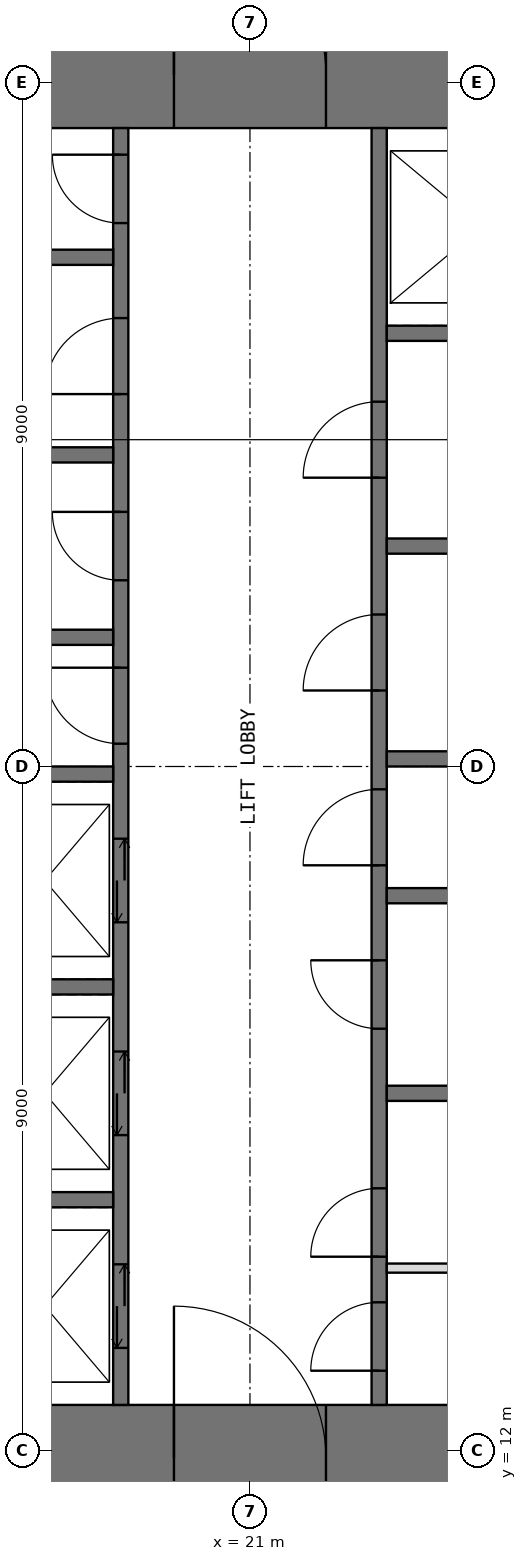
"""IFC4 building model, lengths in metres.
Left out: names, types, materials, properties, quantities, classifications, styles, units other than length and angle.
Written with IfcOpenShell. Run it as: python <this file> out.ifc"""

import sys

from ifc_helpers import new_model, si_unit, direction, frame, frame_2d, origin, place, context, subcontext, project, spatial, rectangle, extrude, element, fill, save


model = new_model("IFC4")
c1 = context("Model", 3, precision=1e-05, world=origin(), true_north=direction((0.0, 1.0)))
c2 = subcontext(c1, "Body", "Model", "MODEL_VIEW")
j1 = project(units=[si_unit("LENGTHUNIT", "METRE"), si_unit("PLANEANGLEUNIT", "RADIAN")], contexts=[c1])
p1 = place(None, origin())
s1 = spatial("IfcSite", under=j1, at=p1, CompositionType="ELEMENT")
p2 = place(p1, origin())
s2 = spatial("IfcBuilding", under=s1, at=p2, CompositionType="ELEMENT")
p3 = place(p2, frame((0.0, 0.0, 174.5)))
s3 = spatial("IfcBuildingStorey", under=s2, at=p3, CompositionType="ELEMENT", Elevation=174.5)
p4 = place(p3, frame((11.2, 11.9, -0.05), z_axis=(0.0, 0.0, 1.0), x_axis=(1.0, 0.0, 0.0)))
e1 = element("IfcWall", 1, at=p4, inside=s3, PredefinedType="SHEAR", context=c2, shape_type="SweptSolid", body=[
    extrude(rectangle(XDim=19.6, YDim=1.4, at=frame_2d((9.8, 0.0))), origin(), (0.0, 0.0, 1.0), 4.0),
])
p5 = place(p4, frame((8.8, 0.0, 0.05)))
e2 = element("IfcOpeningElement", 2, at=p5, cuts=e1, PredefinedType="OPENING", context=c2, shape_type="SweptSolid", body=[
    extrude(rectangle(XDim=2.0, YDim=2.2, at=frame_2d((1.0, 1.1))), frame((0.0, 0.71, 0.0), z_axis=(0.0, -1.0, 0.0), x_axis=(1.0, 0.0, 0.0)), (0.0, 0.0, 1.0), 1.42),
])
p6 = place(p3, frame((11.2, 30.1, -0.05), z_axis=(0.0, 0.0, 1.0), x_axis=(1.0, 0.0, 0.0)))
e3 = element("IfcWall", 3, at=p6, inside=s3, PredefinedType="SHEAR", context=c2, shape_type="SweptSolid", body=[
    extrude(rectangle(XDim=19.6, YDim=1.4, at=frame_2d((9.8, 0.0))), origin(), (0.0, 0.0, 1.0), 4.0),
])
p7 = place(p6, frame((8.8, 0.0, 0.05)))
e4 = element("IfcOpeningElement", 4, at=p7, cuts=e3, PredefinedType="OPENING", context=c2, shape_type="SweptSolid", body=[
    extrude(rectangle(XDim=2.0, YDim=2.2, at=frame_2d((1.0, 1.1))), frame((0.0, 0.71, 0.0), z_axis=(0.0, -1.0, 0.0), x_axis=(1.0, 0.0, 0.0)), (0.0, 0.0, 1.0), 1.42),
])
p8 = place(p3, frame((19.3, 12.6, -0.05), z_axis=(0.0, 0.0, 1.0), x_axis=(0.0, 1.0, 0.0)))
e5 = element("IfcWall", 5, at=p8, inside=s3, PredefinedType="SHEAR", context=c2, shape_type="SweptSolid", body=[
    extrude(rectangle(XDim=16.8, YDim=0.2, at=frame_2d((8.4, 0.0))), origin(), (0.0, 0.0, 1.0), 4.0),
])
p9 = place(p8, frame((8.7, 0.0, 0.05)))
e6 = element("IfcOpeningElement", 6, at=p9, cuts=e5, PredefinedType="OPENING", context=c2, shape_type="SweptSolid", body=[
    extrude(rectangle(XDim=1.0, YDim=2.2, at=frame_2d((0.5, 1.1))), frame((0.0, 0.11, 0.0), z_axis=(0.0, -1.0, 0.0), x_axis=(1.0, 0.0, 0.0)), (0.0, 0.0, 1.0), 0.22),
])
p10 = place(p8, frame((10.85, 0.0, 0.05)))
e7 = element("IfcOpeningElement", 7, at=p10, cuts=e5, PredefinedType="OPENING", context=c2, shape_type="SweptSolid", body=[
    extrude(rectangle(XDim=0.9, YDim=2.2, at=frame_2d((0.45, 1.1))), frame((0.0, 0.11, 0.0), z_axis=(0.0, -1.0, 0.0), x_axis=(1.0, 0.0, 0.0)), (0.0, 0.0, 1.0), 0.22),
])
p11 = place(p8, frame((13.3, 0.0, 0.05)))
e8 = element("IfcOpeningElement", 8, at=p11, cuts=e5, PredefinedType="OPENING", context=c2, shape_type="SweptSolid", body=[
    extrude(rectangle(XDim=1.0, YDim=2.2, at=frame_2d((0.5, 1.1))), frame((0.0, 0.11, 0.0), z_axis=(0.0, -1.0, 0.0), x_axis=(1.0, 0.0, 0.0)), (0.0, 0.0, 1.0), 0.22),
])
p12 = place(p8, frame((15.55, 0.0, 0.05)))
e9 = element("IfcOpeningElement", 9, at=p12, cuts=e5, PredefinedType="OPENING", context=c2, shape_type="SweptSolid", body=[
    extrude(rectangle(XDim=0.9, YDim=2.2, at=frame_2d((0.45, 1.1))), frame((0.0, 0.11, 0.0), z_axis=(0.0, -1.0, 0.0), x_axis=(1.0, 0.0, 0.0)), (0.0, 0.0, 1.0), 0.22),
])
p13 = place(p8, frame((0.75, 0.0, 0.05)))
e10 = element("IfcOpeningElement", 10, at=p13, cuts=e5, PredefinedType="OPENING", context=c2, shape_type="SweptSolid", body=[
    extrude(rectangle(XDim=1.1, YDim=2.2, at=frame_2d((0.55, 1.1))), frame((0.0, 0.11, 0.0), z_axis=(0.0, -1.0, 0.0), x_axis=(1.0, 0.0, 0.0)), (0.0, 0.0, 1.0), 0.22),
])
p14 = place(p8, frame((3.55, 0.0, 0.05)))
e11 = element("IfcOpeningElement", 11, at=p14, cuts=e5, PredefinedType="OPENING", context=c2, shape_type="SweptSolid", body=[
    extrude(rectangle(XDim=1.1, YDim=2.2, at=frame_2d((0.55, 1.1))), frame((0.0, 0.11, 0.0), z_axis=(0.0, -1.0, 0.0), x_axis=(1.0, 0.0, 0.0)), (0.0, 0.0, 1.0), 0.22),
])
p15 = place(p8, frame((6.35, 0.0, 0.05)))
e12 = element("IfcOpeningElement", 12, at=p15, cuts=e5, PredefinedType="OPENING", context=c2, shape_type="SweptSolid", body=[
    extrude(rectangle(XDim=1.1, YDim=2.2, at=frame_2d((0.55, 1.1))), frame((0.0, 0.11, 0.0), z_axis=(0.0, -1.0, 0.0), x_axis=(1.0, 0.0, 0.0)), (0.0, 0.0, 1.0), 0.22),
])
p16 = place(p3, frame((22.7, 12.6, -0.05), z_axis=(0.0, 0.0, 1.0), x_axis=(0.0, 1.0, 0.0)))
e13 = element("IfcWall", 13, at=p16, inside=s3, PredefinedType="SHEAR", context=c2, shape_type="SweptSolid", body=[
    extrude(rectangle(XDim=16.8, YDim=0.2, at=frame_2d((8.4, 0.0))), origin(), (0.0, 0.0, 1.0), 4.0),
])
p17 = place(p16, frame((0.45, 0.0, 0.05)))
e14 = element("IfcOpeningElement", 14, at=p17, cuts=e13, PredefinedType="OPENING", context=c2, shape_type="SweptSolid", body=[
    extrude(rectangle(XDim=0.9, YDim=2.2, at=frame_2d((0.45, 1.1))), frame((0.0, 0.11, 0.0), z_axis=(0.0, -1.0, 0.0), x_axis=(1.0, 0.0, 0.0)), (0.0, 0.0, 1.0), 0.22),
])
p18 = place(p16, frame((7.1, 0.0, 0.05)))
e15 = element("IfcOpeningElement", 15, at=p18, cuts=e13, PredefinedType="OPENING", context=c2, shape_type="SweptSolid", body=[
    extrude(rectangle(XDim=1.0, YDim=2.2, at=frame_2d((0.5, 1.1))), frame((0.0, 0.11, 0.0), z_axis=(0.0, -1.0, 0.0), x_axis=(1.0, 0.0, 0.0)), (0.0, 0.0, 1.0), 0.22),
])
p19 = place(p16, frame((1.95, 0.0, 0.05)))
e16 = element("IfcOpeningElement", 16, at=p19, cuts=e13, PredefinedType="OPENING", context=c2, shape_type="SweptSolid", body=[
    extrude(rectangle(XDim=0.9, YDim=2.2, at=frame_2d((0.45, 1.1))), frame((0.0, 0.11, 0.0), z_axis=(0.0, -1.0, 0.0), x_axis=(1.0, 0.0, 0.0)), (0.0, 0.0, 1.0), 0.22),
])
p20 = place(p16, frame((4.95, 0.0, 0.05)))
e17 = element("IfcOpeningElement", 17, at=p20, cuts=e13, PredefinedType="OPENING", context=c2, shape_type="SweptSolid", body=[
    extrude(rectangle(XDim=0.9, YDim=2.2, at=frame_2d((0.45, 1.1))), frame((0.0, 0.11, 0.0), z_axis=(0.0, -1.0, 0.0), x_axis=(1.0, 0.0, 0.0)), (0.0, 0.0, 1.0), 0.22),
])
p21 = place(p16, frame((9.4, 0.0, 0.05)))
e18 = element("IfcOpeningElement", 18, at=p21, cuts=e13, PredefinedType="OPENING", context=c2, shape_type="SweptSolid", body=[
    extrude(rectangle(XDim=1.0, YDim=2.2, at=frame_2d((0.5, 1.1))), frame((0.0, 0.11, 0.0), z_axis=(0.0, -1.0, 0.0), x_axis=(1.0, 0.0, 0.0)), (0.0, 0.0, 1.0), 0.22),
])
p22 = place(p16, frame((12.2, 0.0, 0.05)))
e19 = element("IfcOpeningElement", 19, at=p22, cuts=e13, PredefinedType="OPENING", context=c2, shape_type="SweptSolid", body=[
    extrude(rectangle(XDim=1.0, YDim=2.2, at=frame_2d((0.5, 1.1))), frame((0.0, 0.11, 0.0), z_axis=(0.0, -1.0, 0.0), x_axis=(1.0, 0.0, 0.0)), (0.0, 0.0, 1.0), 0.22),
])
for number, where, z_axis, x_axis in (
    (20, (16.0, 15.3, -0.05), (0.0, 0.0, 1.0), (1.0, 0.0, 0.0)),
    (21, (16.0, 18.1, -0.05), (0.0, 0.0, 1.0), (1.0, 0.0, 0.0)),
    (22, (16.0, 20.9, -0.05), (0.0, 0.0, 1.0), (1.0, 0.0, 0.0)),
    (23, (16.0, 22.7, -0.05), (0.0, 0.0, 1.0), (1.0, 0.0, 0.0)),
    (24, (16.0, 25.1, -0.05), (0.0, 0.0, 1.0), (1.0, 0.0, 0.0)),
    (25, (16.0, 27.7, -0.05), (0.0, 0.0, 1.0), (1.0, 0.0, 0.0)),
    (26, (22.8, 16.7, -0.05), (0.0, 0.0, 1.0), (1.0, 0.0, 0.0)),
    (27, (22.8, 19.3, -0.05), (0.0, 0.0, 1.0), (1.0, 0.0, 0.0)),
    (28, (22.8, 21.1, -0.05), (0.0, 0.0, 1.0), (1.0, 0.0, 0.0)),
    (29, (22.8, 23.9, -0.05), (0.0, 0.0, 1.0), (1.0, 0.0, 0.0)),
    (30, (22.8, 26.7, -0.05), (0.0, 0.0, 1.0), (1.0, 0.0, 0.0)),
):
    element("IfcWall", number, at=place(p3, frame(where, z_axis=z_axis, x_axis=x_axis)), inside=s3, PredefinedType="SHEAR", context=c2, shape_type="SweptSolid", body=[
        extrude(rectangle(XDim=3.2, YDim=0.2, at=frame_2d((1.6, 0.0))), origin(), (0.0, 0.0, 1.0), 4.0),
    ])
p23 = place(p3, frame((22.8, 14.4, 0.0), z_axis=(0.0, 0.0, 1.0), x_axis=(1.0, 0.0, 0.0)))
e31 = element("IfcWall", 31, at=p23, inside=s3, PredefinedType="PARTITIONING", context=c2, shape_type="SweptSolid", body=[
    extrude(rectangle(XDim=3.2, YDim=0.12, at=frame_2d((1.6, 0.0))), origin(), (0.0, 0.0, 1.0), 3.75),
])
p24 = place(p5, origin())
e32 = element("IfcDoor", 32, at=p24, inside=s3, OperationType="DOUBLE_DOOR_SINGLE_SWING", PredefinedType="DOOR", context=c2, shape_type="SweptSolid", body=[
    extrude(rectangle(XDim=2.0, YDim=2.2, at=frame_2d((1.0, 1.1))), frame((0.0, 0.025, 0.0), z_axis=(0.0, -1.0, 0.0), x_axis=(1.0, 0.0, 0.0)), (0.0, 0.0, 1.0), 0.05),
])
fill(e2, e32)
p25 = place(p7, origin())
e33 = element("IfcDoor", 33, at=p25, inside=s3, OperationType="DOUBLE_DOOR_SINGLE_SWING", PredefinedType="DOOR", context=c2, shape_type="SweptSolid", body=[
    extrude(rectangle(XDim=2.0, YDim=2.2, at=frame_2d((1.0, 1.1))), frame((0.0, 0.025, 0.0), z_axis=(0.0, -1.0, 0.0), x_axis=(1.0, 0.0, 0.0)), (0.0, 0.0, 1.0), 0.05),
])
fill(e4, e33)
p26 = place(p17, origin())
e34 = element("IfcDoor", 34, at=p26, inside=s3, OperationType="SINGLE_SWING_LEFT", PredefinedType="DOOR", context=c2, shape_type="SweptSolid", body=[
    extrude(rectangle(XDim=0.9, YDim=2.2, at=frame_2d((0.45, 1.1))), frame((0.0, 0.025, 0.0), z_axis=(0.0, -1.0, 0.0), x_axis=(1.0, 0.0, 0.0)), (0.0, 0.0, 1.0), 0.05),
])
fill(e14, e34)
p27 = place(p9, origin())
e35 = element("IfcDoor", 35, at=p27, inside=s3, OperationType="SINGLE_SWING_RIGHT", PredefinedType="DOOR", context=c2, shape_type="SweptSolid", body=[
    extrude(rectangle(XDim=1.0, YDim=2.2, at=frame_2d((0.5, 1.1))), frame((0.0, 0.025, 0.0), z_axis=(0.0, -1.0, 0.0), x_axis=(1.0, 0.0, 0.0)), (0.0, 0.0, 1.0), 0.05),
])
fill(e6, e35)
p28 = place(p18, origin())
e36 = element("IfcDoor", 36, at=p28, inside=s3, OperationType="SINGLE_SWING_LEFT", PredefinedType="DOOR", context=c2, shape_type="SweptSolid", body=[
    extrude(rectangle(XDim=1.0, YDim=2.2, at=frame_2d((0.5, 1.1))), frame((0.0, 0.025, 0.0), z_axis=(0.0, -1.0, 0.0), x_axis=(1.0, 0.0, 0.0)), (0.0, 0.0, 1.0), 0.05),
])
fill(e15, e36)
p29 = place(p10, origin())
e37 = element("IfcDoor", 37, at=p29, inside=s3, OperationType="SINGLE_SWING_RIGHT", PredefinedType="DOOR", context=c2, shape_type="SweptSolid", body=[
    extrude(rectangle(XDim=0.9, YDim=2.2, at=frame_2d((0.45, 1.1))), frame((0.0, 0.025, 0.0), z_axis=(0.0, -1.0, 0.0), x_axis=(1.0, 0.0, 0.0)), (0.0, 0.0, 1.0), 0.05),
])
fill(e7, e37)
p30 = place(p11, origin())
e38 = element("IfcDoor", 38, at=p30, inside=s3, OperationType="SINGLE_SWING_LEFT", PredefinedType="DOOR", context=c2, shape_type="SweptSolid", body=[
    extrude(rectangle(XDim=1.0, YDim=2.2, at=frame_2d((0.5, 1.1))), frame((0.0, 0.025, 0.0), z_axis=(0.0, -1.0, 0.0), x_axis=(1.0, 0.0, 0.0)), (0.0, 0.0, 1.0), 0.05),
])
fill(e8, e38)
p31 = place(p12, origin())
e39 = element("IfcDoor", 39, at=p31, inside=s3, OperationType="SINGLE_SWING_RIGHT", PredefinedType="DOOR", context=c2, shape_type="SweptSolid", body=[
    extrude(rectangle(XDim=0.9, YDim=2.2, at=frame_2d((0.45, 1.1))), frame((0.0, 0.025, 0.0), z_axis=(0.0, -1.0, 0.0), x_axis=(1.0, 0.0, 0.0)), (0.0, 0.0, 1.0), 0.05),
])
fill(e9, e39)
p32 = place(p19, origin())
e40 = element("IfcDoor", 40, at=p32, inside=s3, OperationType="SINGLE_SWING_LEFT", PredefinedType="DOOR", context=c2, shape_type="SweptSolid", body=[
    extrude(rectangle(XDim=0.9, YDim=2.2, at=frame_2d((0.45, 1.1))), frame((0.0, 0.025, 0.0), z_axis=(0.0, -1.0, 0.0), x_axis=(1.0, 0.0, 0.0)), (0.0, 0.0, 1.0), 0.05),
])
fill(e16, e40)
p33 = place(p20, origin())
e41 = element("IfcDoor", 41, at=p33, inside=s3, OperationType="SINGLE_SWING_RIGHT", PredefinedType="DOOR", context=c2, shape_type="SweptSolid", body=[
    extrude(rectangle(XDim=0.9, YDim=2.2, at=frame_2d((0.45, 1.1))), frame((0.0, 0.025, 0.0), z_axis=(0.0, -1.0, 0.0), x_axis=(1.0, 0.0, 0.0)), (0.0, 0.0, 1.0), 0.05),
])
fill(e17, e41)
p34 = place(p21, origin())
e42 = element("IfcDoor", 42, at=p34, inside=s3, OperationType="SINGLE_SWING_LEFT", PredefinedType="DOOR", context=c2, shape_type="SweptSolid", body=[
    extrude(rectangle(XDim=1.0, YDim=2.2, at=frame_2d((0.5, 1.1))), frame((0.0, 0.025, 0.0), z_axis=(0.0, -1.0, 0.0), x_axis=(1.0, 0.0, 0.0)), (0.0, 0.0, 1.0), 0.05),
])
fill(e18, e42)
p35 = place(p22, origin())
e43 = element("IfcDoor", 43, at=p35, inside=s3, OperationType="SINGLE_SWING_LEFT", PredefinedType="DOOR", context=c2, shape_type="SweptSolid", body=[
    extrude(rectangle(XDim=1.0, YDim=2.2, at=frame_2d((0.5, 1.1))), frame((0.0, 0.025, 0.0), z_axis=(0.0, -1.0, 0.0), x_axis=(1.0, 0.0, 0.0)), (0.0, 0.0, 1.0), 0.05),
])
fill(e19, e43)
p36 = place(p13, origin())
e44 = element("IfcDoor", 44, at=p36, inside=s3, OperationType="DOUBLE_DOOR_SLIDING", PredefinedType="DOOR", context=c2, shape_type="SweptSolid", body=[
    extrude(rectangle(XDim=1.1, YDim=2.2, at=frame_2d((0.55, 1.1))), frame((0.0, 0.025, 0.0), z_axis=(0.0, -1.0, 0.0), x_axis=(1.0, 0.0, 0.0)), (0.0, 0.0, 1.0), 0.05),
])
fill(e10, e44)
p37 = place(p14, origin())
e45 = element("IfcDoor", 45, at=p37, inside=s3, OperationType="DOUBLE_DOOR_SLIDING", PredefinedType="DOOR", context=c2, shape_type="SweptSolid", body=[
    extrude(rectangle(XDim=1.1, YDim=2.2, at=frame_2d((0.55, 1.1))), frame((0.0, 0.025, 0.0), z_axis=(0.0, -1.0, 0.0), x_axis=(1.0, 0.0, 0.0)), (0.0, 0.0, 1.0), 0.05),
])
fill(e11, e45)
p38 = place(p15, origin())
e46 = element("IfcDoor", 46, at=p38, inside=s3, OperationType="DOUBLE_DOOR_SLIDING", PredefinedType="DOOR", context=c2, shape_type="SweptSolid", body=[
    extrude(rectangle(XDim=1.1, YDim=2.2, at=frame_2d((0.55, 1.1))), frame((0.0, 0.025, 0.0), z_axis=(0.0, -1.0, 0.0), x_axis=(1.0, 0.0, 0.0)), (0.0, 0.0, 1.0), 0.05),
])
fill(e12, e46)
save(model, sys.argv[1])
